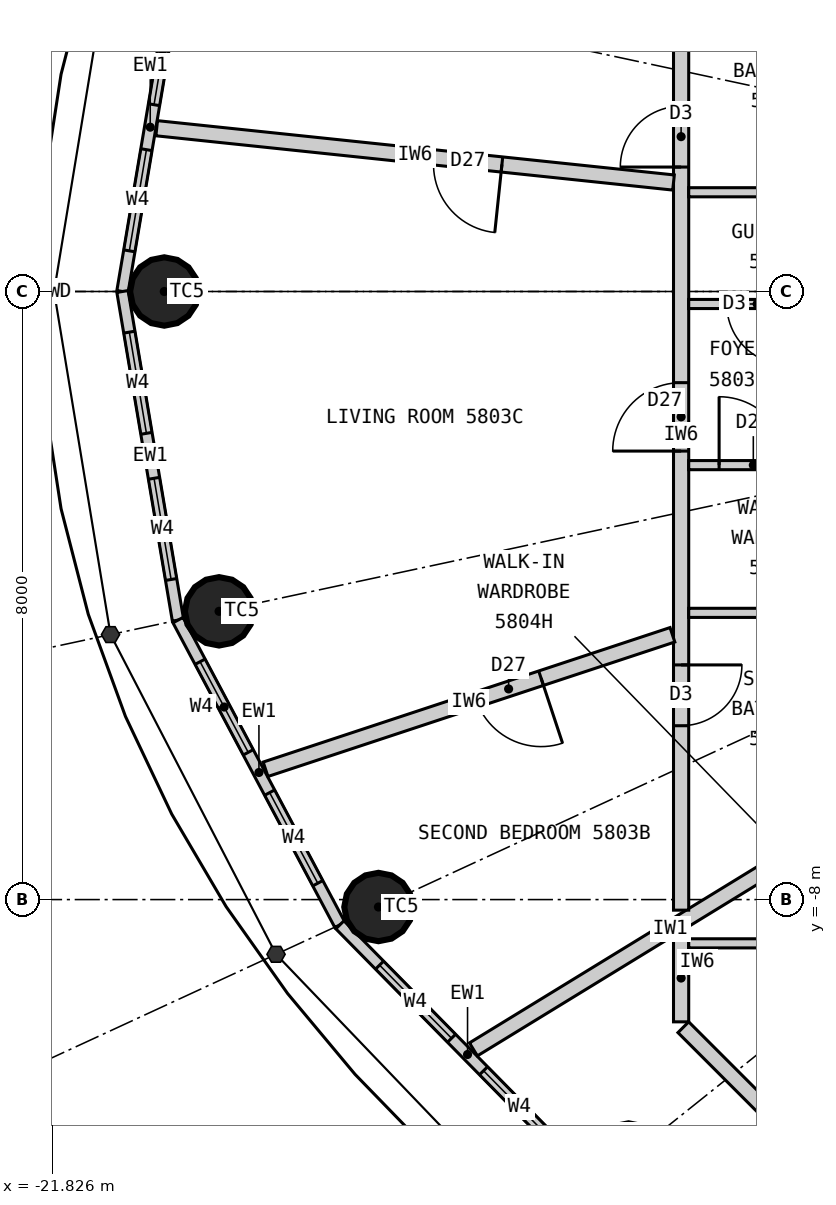
"""IFC4 building model, lengths in metres.
Left out: names, types, materials, properties, quantities, classifications, styles, units other than length and angle.
Written with IfcOpenShell. Run it as: python <this file> out.ifc"""

import sys

from ifc_helpers import new_model, si_unit, direction, frame, frame_2d, origin, origin_2d, place, context, subcontext, project, spatial, rectangle, circle, extrude, element, fill, save


model = new_model("IFC4")
c1 = context("Model", 3, precision=1e-05, world=origin(), true_north=direction((0.0, 1.0)))
c2 = subcontext(c1, "Body", "Model", "MODEL_VIEW")
j1 = project(units=[si_unit("LENGTHUNIT", "METRE"), si_unit("PLANEANGLEUNIT", "RADIAN")], contexts=[c1])
p1 = place(None, origin())
s1 = spatial("IfcSite", under=j1, at=p1, CompositionType="ELEMENT")
p2 = place(p1, origin())
s2 = spatial("IfcBuilding", under=s1, at=p2, CompositionType="ELEMENT")
p3 = place(p2, frame((0.0, 0.0, 216.0)))
s3 = spatial("IfcBuildingStorey", under=s2, at=p3, CompositionType="ELEMENT", Elevation=216.0)
for number, where, z_axis, x_axis in (
    (1, (-20.35, 0.0, 0.0), (0.0, 0.0, 1.0), (1.0, 0.0, 0.0)),
    (2, (-19.629, -4.208, 0.0), (0.0, 0.0, 1.0), (1.0, 0.0, 0.0)),
    (3, (-17.532, -8.098, 0.0), (0.0, 0.0, 1.0), (1.0, 0.0, 0.0)),
    (4, (-14.241, -11.393, 0.0), (0.0, 0.0, 1.0), (1.0, 0.0, 0.0)),
):
    element("IfcColumn", number, at=place(p3, frame(where, z_axis=z_axis, x_axis=x_axis)), inside=s3, PredefinedType="COLUMN", context=c2, shape_type="SweptSolid", body=[
        extrude(circle(Radius=0.45, at=origin_2d()), origin(), (0.0, 0.0, 1.0), 3.3),
    ])
p4 = place(p3, frame((-20.17, 4.323, 0.0), z_axis=(0.0, 0.0, 1.0), x_axis=(-0.166538513568, -0.986034950445, 0.0)))
e5 = element("IfcWall", 5, at=p4, inside=s3, PredefinedType="ELEMENTEDWALL", context=c2, shape_type="SweptSolid", body=[
    extrude(rectangle(XDim=4.385, YDim=0.15, at=frame_2d((2.192, 0.0))), origin(), (0.0, 0.0, 1.0), 3.12),
])
p5 = place(p4, frame((0.542, 0.0, 0.9)))
e6 = element("IfcOpeningElement", 6, at=p5, cuts=e5, PredefinedType="OPENING", context=c2, shape_type="SweptSolid", body=[
    extrude(rectangle(XDim=1.35, YDim=1.9, at=frame_2d((0.675, 0.95))), frame((0.0, 0.085, 0.0), z_axis=(0.0, -1.0, 0.0), x_axis=(1.0, 0.0, 0.0)), (0.0, 0.0, 1.0), 0.17),
])
p6 = place(p4, frame((2.492, 0.0, 0.9)))
e7 = element("IfcOpeningElement", 7, at=p6, cuts=e5, PredefinedType="OPENING", context=c2, shape_type="SweptSolid", body=[
    extrude(rectangle(XDim=1.35, YDim=1.9, at=frame_2d((0.675, 0.95))), frame((0.0, 0.085, 0.0), z_axis=(0.0, -1.0, 0.0), x_axis=(1.0, 0.0, 0.0)), (0.0, 0.0, 1.0), 0.17),
])
p7 = place(p3, frame((-20.9, 0.0, 0.0), z_axis=(0.0, 0.0, 1.0), x_axis=(0.166538513568, -0.986034950445, 0.0)))
e8 = element("IfcWall", 8, at=p7, inside=s3, PredefinedType="ELEMENTEDWALL", context=c2, shape_type="SweptSolid", body=[
    extrude(rectangle(XDim=4.385, YDim=0.15, at=frame_2d((2.192, 0.0))), origin(), (0.0, 0.0, 1.0), 3.12),
])
p8 = place(p7, frame((0.542, 0.0, 0.9)))
e9 = element("IfcOpeningElement", 9, at=p8, cuts=e8, PredefinedType="OPENING", context=c2, shape_type="SweptSolid", body=[
    extrude(rectangle(XDim=1.35, YDim=1.9, at=frame_2d((0.675, 0.95))), frame((0.0, 0.085, 0.0), z_axis=(0.0, -1.0, 0.0), x_axis=(1.0, 0.0, 0.0)), (0.0, 0.0, 1.0), 0.17),
])
p9 = place(p7, frame((2.492, 0.0, 0.9)))
e10 = element("IfcOpeningElement", 10, at=p9, cuts=e8, PredefinedType="OPENING", context=c2, shape_type="SweptSolid", body=[
    extrude(rectangle(XDim=1.35, YDim=1.9, at=frame_2d((0.675, 0.95))), frame((0.0, 0.085, 0.0), z_axis=(0.0, -1.0, 0.0), x_axis=(1.0, 0.0, 0.0)), (0.0, 0.0, 1.0), 0.17),
])
p10 = place(p3, frame((-20.17, -4.323, 0.0), z_axis=(0.0, 0.0, 1.0), x_axis=(0.469256152955, -0.883062094597, 0.0)))
e11 = element("IfcWall", 11, at=p10, inside=s3, PredefinedType="ELEMENTEDWALL", context=c2, shape_type="SweptSolid", body=[
    extrude(rectangle(XDim=4.539, YDim=0.15, at=frame_2d((2.27, 0.0))), origin(), (0.0, 0.0, 1.0), 3.12),
])
p11 = place(p10, frame((0.62, 0.0, 0.9)))
e12 = element("IfcOpeningElement", 12, at=p11, cuts=e11, PredefinedType="OPENING", context=c2, shape_type="SweptSolid", body=[
    extrude(rectangle(XDim=1.35, YDim=1.9, at=frame_2d((0.675, 0.95))), frame((0.0, 0.085, 0.0), z_axis=(0.0, -1.0, 0.0), x_axis=(1.0, 0.0, 0.0)), (0.0, 0.0, 1.0), 0.17),
])
p12 = place(p10, frame((2.57, 0.0, 0.9)))
e13 = element("IfcOpeningElement", 13, at=p12, cuts=e11, PredefinedType="OPENING", context=c2, shape_type="SweptSolid", body=[
    extrude(rectangle(XDim=1.35, YDim=1.9, at=frame_2d((0.675, 0.95))), frame((0.0, 0.085, 0.0), z_axis=(0.0, -1.0, 0.0), x_axis=(1.0, 0.0, 0.0)), (0.0, 0.0, 1.0), 0.17),
])
p13 = place(p3, frame((-18.04, -8.332, 0.0), z_axis=(0.0, 0.0, 1.0), x_axis=(0.701527379618, -0.712642501993, 0.0)))
e14 = element("IfcWall", 14, at=p13, inside=s3, PredefinedType="ELEMENTEDWALL", context=c2, shape_type="SweptSolid", body=[
    extrude(rectangle(XDim=4.788, YDim=0.15, at=frame_2d((2.394, 0.0))), origin(), (0.0, 0.0, 1.0), 3.12),
])
p14 = place(p13, frame((0.744, 0.0, 0.9)))
e15 = element("IfcOpeningElement", 15, at=p14, cuts=e14, PredefinedType="OPENING", context=c2, shape_type="SweptSolid", body=[
    extrude(rectangle(XDim=1.35, YDim=1.9, at=frame_2d((0.675, 0.95))), frame((0.0, 0.085, 0.0), z_axis=(0.0, -1.0, 0.0), x_axis=(1.0, 0.0, 0.0)), (0.0, 0.0, 1.0), 0.17),
])
p15 = place(p13, frame((2.694, 0.0, 0.9)))
e16 = element("IfcOpeningElement", 16, at=p15, cuts=e14, PredefinedType="OPENING", context=c2, shape_type="SweptSolid", body=[
    extrude(rectangle(XDim=1.35, YDim=1.9, at=frame_2d((0.675, 0.95))), frame((0.0, 0.085, 0.0), z_axis=(0.0, -1.0, 0.0), x_axis=(1.0, 0.0, 0.0)), (0.0, 0.0, 1.0), 0.17),
])
p16 = place(p3, frame((-11.1, -6.797, 0.0), z_axis=(0.0, 0.0, 1.0), x_axis=(-0.852799818179, -0.522237943963, 0.0)))
e17 = element("IfcWall", 17, at=p16, inside=s3, PredefinedType="PARTITIONING", context=c2, shape_type="SweptSolid", body=[
    extrude(rectangle(XDim=6.077, YDim=0.2, at=frame_2d((3.039, 0.0))), origin(), (0.0, 0.0, 1.0), 3.12),
])
p17 = place(p3, frame((-13.55, 4.357, 0.0), z_axis=(0.0, 0.0, 1.0), x_axis=(0.0, -1.0, 0.0)))
e18 = element("IfcWall", 18, at=p17, inside=s3, PredefinedType="PARTITIONING", context=c2, shape_type="SweptSolid", body=[
    extrude(rectangle(XDim=12.496, YDim=0.2, at=frame_2d((6.248, 0.0))), origin(), (0.0, 0.0, 1.0), 3.12),
])
p18 = place(p17, frame((1.92, 0.0, 0.0)))
e19 = element("IfcOpeningElement", 19, at=p18, cuts=e18, PredefinedType="OPENING", context=c2, shape_type="SweptSolid", body=[
    extrude(rectangle(XDim=0.8, YDim=2.1, at=frame_2d((0.4, 1.05))), frame((0.0, 0.11, 0.0), z_axis=(0.0, -1.0, 0.0), x_axis=(1.0, 0.0, 0.0)), (0.0, 0.0, 1.0), 0.22),
])
p19 = place(p17, frame((9.27, 0.0, 0.0)))
e20 = element("IfcOpeningElement", 20, at=p19, cuts=e18, PredefinedType="OPENING", context=c2, shape_type="SweptSolid", body=[
    extrude(rectangle(XDim=0.8, YDim=2.1, at=frame_2d((0.4, 1.05))), frame((0.0, 0.11, 0.0), z_axis=(0.0, -1.0, 0.0), x_axis=(1.0, 0.0, 0.0)), (0.0, 0.0, 1.0), 0.22),
])
p20 = place(p17, frame((5.557, 0.0, 0.0)))
e21 = element("IfcOpeningElement", 21, at=p20, cuts=e18, PredefinedType="OPENING", context=c2, shape_type="SweptSolid", body=[
    extrude(rectangle(XDim=0.9, YDim=2.1, at=frame_2d((0.45, 1.05))), frame((0.0, 0.11, 0.0), z_axis=(0.0, -1.0, 0.0), x_axis=(1.0, 0.0, 0.0)), (0.0, 0.0, 1.0), 0.22),
])
p21 = place(p3, frame((-13.65, 1.434, 0.0), z_axis=(0.0, 0.0, 1.0), x_axis=(-0.994526954268, 0.10448031984, 0.0)))
e22 = element("IfcWall", 22, at=p21, inside=s3, PredefinedType="PARTITIONING", context=c2, shape_type="SweptSolid", body=[
    extrude(rectangle(XDim=6.837, YDim=0.2, at=frame_2d((3.418, 0.0))), origin(), (0.0, 0.0, 1.0), 2.47),
])
p22 = place(p21, frame((2.27, 0.0, 0.0)))
e23 = element("IfcOpeningElement", 23, at=p22, cuts=e22, PredefinedType="OPENING", context=c2, shape_type="SweptSolid", body=[
    extrude(rectangle(XDim=0.9, YDim=2.1, at=frame_2d((0.45, 1.05))), frame((0.0, 0.11, 0.0), z_axis=(0.0, -1.0, 0.0), x_axis=(1.0, 0.0, 0.0)), (0.0, 0.0, 1.0), 0.22),
])
p23 = place(p3, frame((-13.664, -4.516, 0.0), z_axis=(0.0, 0.0, 1.0), x_axis=(-0.949481375941, -0.313823384632, 0.0)))
e24 = element("IfcWall", 24, at=p23, inside=s3, PredefinedType="PARTITIONING", context=c2, shape_type="SweptSolid", body=[
    extrude(rectangle(XDim=5.638, YDim=0.2, at=frame_2d((2.819, 0.0))), origin(), (0.0, 0.0, 1.0), 3.12),
])
p24 = place(p23, frame((1.82, 0.0, 0.0)))
e25 = element("IfcOpeningElement", 25, at=p24, cuts=e24, PredefinedType="OPENING", context=c2, shape_type="SweptSolid", body=[
    extrude(rectangle(XDim=0.9, YDim=2.1, at=frame_2d((0.45, 1.05))), frame((0.0, 0.11, 0.0), z_axis=(0.0, -1.0, 0.0), x_axis=(1.0, 0.0, 0.0)), (0.0, 0.0, 1.0), 0.22),
])
p25 = place(p3, frame((-11.1, 1.306, 0.0), z_axis=(0.0, 0.0, 1.0), x_axis=(-1.0, 0.0, 0.0)))
e26 = element("IfcWall", 26, at=p25, inside=s3, PredefinedType="PARTITIONING", context=c2, shape_type="SweptSolid", body=[
    extrude(rectangle(XDim=2.35, YDim=0.12, at=frame_2d((1.175, 0.0))), origin(), (0.0, 0.0, 1.0), 3.12),
])
p26 = place(p3, frame((-11.1, -0.164, 0.0), z_axis=(0.0, 0.0, 1.0), x_axis=(-1.0, 0.0, 0.0)))
e27 = element("IfcWall", 27, at=p26, inside=s3, PredefinedType="PARTITIONING", context=c2, shape_type="SweptSolid", body=[
    extrude(rectangle(XDim=2.35, YDim=0.12, at=frame_2d((1.175, 0.0))), origin(), (0.0, 0.0, 1.0), 3.12),
])
p27 = place(p26, frame((1.05, 0.0, 0.0)))
e28 = element("IfcOpeningElement", 28, at=p27, cuts=e27, PredefinedType="OPENING", context=c2, shape_type="SweptSolid", body=[
    extrude(rectangle(XDim=0.8, YDim=2.1, at=frame_2d((0.4, 1.05))), frame((0.0, 0.07, 0.0), z_axis=(0.0, -1.0, 0.0), x_axis=(1.0, 0.0, 0.0)), (0.0, 0.0, 1.0), 0.14),
])
p28 = place(p3, frame((-11.1, -2.284, 0.0), z_axis=(0.0, 0.0, 1.0), x_axis=(-1.0, 0.0, 0.0)))
e29 = element("IfcWall", 29, at=p28, inside=s3, PredefinedType="PARTITIONING", context=c2, shape_type="SweptSolid", body=[
    extrude(rectangle(XDim=2.35, YDim=0.12, at=frame_2d((1.175, 0.0))), origin(), (0.0, 0.0, 1.0), 3.12),
])
p29 = place(p28, frame((1.05, 0.0, 0.0)))
e30 = element("IfcOpeningElement", 30, at=p29, cuts=e29, PredefinedType="OPENING", context=c2, shape_type="SweptSolid", body=[
    extrude(rectangle(XDim=0.9, YDim=2.1, at=frame_2d((0.45, 1.05))), frame((0.0, 0.07, 0.0), z_axis=(0.0, -1.0, 0.0), x_axis=(1.0, 0.0, 0.0)), (0.0, 0.0, 1.0), 0.14),
])
p30 = place(p3, frame((-11.1, -4.228, 0.0), z_axis=(0.0, 0.0, 1.0), x_axis=(-1.0, 0.0, 0.0)))
e31 = element("IfcWall", 31, at=p30, inside=s3, PredefinedType="PARTITIONING", context=c2, shape_type="SweptSolid", body=[
    extrude(rectangle(XDim=2.35, YDim=0.12, at=frame_2d((1.175, 0.0))), origin(), (0.0, 0.0, 1.0), 3.12),
])
p31 = place(p3, frame((-13.55, -8.456, 0.0), z_axis=(0.0, 0.0, 1.0), x_axis=(0.0, -1.0, 0.0)))
e32 = element("IfcWall", 32, at=p31, inside=s3, PredefinedType="PARTITIONING", context=c2, shape_type="SweptSolid", body=[
    extrude(rectangle(XDim=1.153, YDim=0.2, at=frame_2d((0.576, 0.0))), origin(), (0.0, 0.0, 1.0), 3.12),
])
p32 = place(p3, frame((-13.521, -9.679, 0.0), z_axis=(0.0, 0.0, 1.0), x_axis=(0.707106781187, -0.707106781187, 0.0)))
e33 = element("IfcWall", 33, at=p32, inside=s3, PredefinedType="PARTITIONING", context=c2, shape_type="SweptSolid", body=[
    extrude(rectangle(XDim=4.019, YDim=0.2, at=frame_2d((2.009, 0.0))), origin(), (0.0, 0.0, 1.0), 3.12),
])
p33 = place(p32, frame((1.57, 0.0, 0.0)))
e34 = element("IfcOpeningElement", 34, at=p33, cuts=e33, PredefinedType="OPENING", context=c2, shape_type="SweptSolid", body=[
    extrude(rectangle(XDim=0.9, YDim=2.1, at=frame_2d((0.45, 1.05))), frame((0.0, 0.11, 0.0), z_axis=(0.0, -1.0, 0.0), x_axis=(1.0, 0.0, 0.0)), (0.0, 0.0, 1.0), 0.22),
])
p34 = place(p3, frame((-11.1, -8.576, 0.0), z_axis=(0.0, 0.0, 1.0), x_axis=(-1.0, 0.0, 0.0)))
e35 = element("IfcWall", 35, at=p34, inside=s3, PredefinedType="PARTITIONING", context=c2, shape_type="SweptSolid", body=[
    extrude(rectangle(XDim=2.35, YDim=0.12, at=frame_2d((1.175, 0.0))), origin(), (0.0, 0.0, 1.0), 3.12),
])
p35 = place(p34, frame((0.22, 0.0, 0.0)))
e36 = element("IfcOpeningElement", 36, at=p35, cuts=e35, PredefinedType="OPENING", context=c2, shape_type="SweptSolid", body=[
    extrude(rectangle(XDim=0.9, YDim=2.1, at=frame_2d((0.45, 1.05))), frame((0.0, 0.07, 0.0), z_axis=(0.0, -1.0, 0.0), x_axis=(1.0, 0.0, 0.0)), (0.0, 0.0, 1.0), 0.14),
])
p36 = place(p5, origin())
e37 = element("IfcWindow", 37, at=p36, inside=s3, PartitioningType="SINGLE_PANEL", PredefinedType="WINDOW", context=c2, shape_type="SweptSolid", body=[
    extrude(rectangle(XDim=1.35, YDim=1.9, at=frame_2d((0.675, 0.95))), frame((0.0, 0.03, 0.0), z_axis=(0.0, -1.0, 0.0), x_axis=(1.0, 0.0, 0.0)), (0.0, 0.0, 1.0), 0.06),
])
fill(e6, e37)
p37 = place(p6, origin())
e38 = element("IfcWindow", 38, at=p37, inside=s3, PartitioningType="SINGLE_PANEL", PredefinedType="WINDOW", context=c2, shape_type="SweptSolid", body=[
    extrude(rectangle(XDim=1.35, YDim=1.9, at=frame_2d((0.675, 0.95))), frame((0.0, 0.03, 0.0), z_axis=(0.0, -1.0, 0.0), x_axis=(1.0, 0.0, 0.0)), (0.0, 0.0, 1.0), 0.06),
])
fill(e7, e38)
p38 = place(p8, origin())
e39 = element("IfcWindow", 39, at=p38, inside=s3, PartitioningType="SINGLE_PANEL", PredefinedType="WINDOW", context=c2, shape_type="SweptSolid", body=[
    extrude(rectangle(XDim=1.35, YDim=1.9, at=frame_2d((0.675, 0.95))), frame((0.0, 0.03, 0.0), z_axis=(0.0, -1.0, 0.0), x_axis=(1.0, 0.0, 0.0)), (0.0, 0.0, 1.0), 0.06),
])
fill(e9, e39)
p39 = place(p9, origin())
e40 = element("IfcWindow", 40, at=p39, inside=s3, PartitioningType="SINGLE_PANEL", PredefinedType="WINDOW", context=c2, shape_type="SweptSolid", body=[
    extrude(rectangle(XDim=1.35, YDim=1.9, at=frame_2d((0.675, 0.95))), frame((0.0, 0.03, 0.0), z_axis=(0.0, -1.0, 0.0), x_axis=(1.0, 0.0, 0.0)), (0.0, 0.0, 1.0), 0.06),
])
fill(e10, e40)
p40 = place(p11, origin())
e41 = element("IfcWindow", 41, at=p40, inside=s3, PartitioningType="SINGLE_PANEL", PredefinedType="WINDOW", context=c2, shape_type="SweptSolid", body=[
    extrude(rectangle(XDim=1.35, YDim=1.9, at=frame_2d((0.675, 0.95))), frame((0.0, 0.03, 0.0), z_axis=(0.0, -1.0, 0.0), x_axis=(1.0, 0.0, 0.0)), (0.0, 0.0, 1.0), 0.06),
])
fill(e12, e41)
p41 = place(p12, origin())
e42 = element("IfcWindow", 42, at=p41, inside=s3, PartitioningType="SINGLE_PANEL", PredefinedType="WINDOW", context=c2, shape_type="SweptSolid", body=[
    extrude(rectangle(XDim=1.35, YDim=1.9, at=frame_2d((0.675, 0.95))), frame((0.0, 0.03, 0.0), z_axis=(0.0, -1.0, 0.0), x_axis=(1.0, 0.0, 0.0)), (0.0, 0.0, 1.0), 0.06),
])
fill(e13, e42)
p42 = place(p14, origin())
e43 = element("IfcWindow", 43, at=p42, inside=s3, PartitioningType="SINGLE_PANEL", PredefinedType="WINDOW", context=c2, shape_type="SweptSolid", body=[
    extrude(rectangle(XDim=1.35, YDim=1.9, at=frame_2d((0.675, 0.95))), frame((0.0, 0.03, 0.0), z_axis=(0.0, -1.0, 0.0), x_axis=(1.0, 0.0, 0.0)), (0.0, 0.0, 1.0), 0.06),
])
fill(e15, e43)
p43 = place(p15, origin())
e44 = element("IfcWindow", 44, at=p43, inside=s3, PartitioningType="SINGLE_PANEL", PredefinedType="WINDOW", context=c2, shape_type="SweptSolid", body=[
    extrude(rectangle(XDim=1.35, YDim=1.9, at=frame_2d((0.675, 0.95))), frame((0.0, 0.03, 0.0), z_axis=(0.0, -1.0, 0.0), x_axis=(1.0, 0.0, 0.0)), (0.0, 0.0, 1.0), 0.06),
])
fill(e16, e44)
p44 = place(p18, origin())
e45 = element("IfcDoor", 45, at=p44, inside=s3, OperationType="SINGLE_SWING_RIGHT", PredefinedType="DOOR", context=c2, shape_type="SweptSolid", body=[
    extrude(rectangle(XDim=0.8, YDim=2.1, at=frame_2d((0.4, 1.05))), frame((0.0, 0.025, 0.0), z_axis=(0.0, -1.0, 0.0), x_axis=(1.0, 0.0, 0.0)), (0.0, 0.0, 1.0), 0.05),
])
fill(e19, e45)
p45 = place(p27, origin())
e46 = element("IfcDoor", 46, at=p45, inside=s3, OperationType="SINGLE_SWING_LEFT", PredefinedType="DOOR", context=c2, shape_type="SweptSolid", body=[
    extrude(rectangle(XDim=0.8, YDim=2.1, at=frame_2d((0.4, 1.05))), frame((0.0, 0.025, 0.0), z_axis=(0.0, -1.0, 0.0), x_axis=(1.0, 0.0, 0.0)), (0.0, 0.0, 1.0), 0.05),
])
fill(e28, e46)
p46 = place(p29, origin())
e47 = element("IfcDoor", 47, at=p46, inside=s3, OperationType="SINGLE_SWING_RIGHT", PredefinedType="DOOR", context=c2, shape_type="SweptSolid", body=[
    extrude(rectangle(XDim=0.9, YDim=2.1, at=frame_2d((0.45, 1.05))), frame((0.0, 0.025, 0.0), z_axis=(0.0, -1.0, 0.0), x_axis=(1.0, 0.0, 0.0)), (0.0, 0.0, 1.0), 0.05),
])
fill(e30, e47)
p47 = place(p19, origin())
e48 = element("IfcDoor", 48, at=p47, inside=s3, OperationType="SINGLE_SWING_LEFT", PredefinedType="DOOR", context=c2, shape_type="SweptSolid", body=[
    extrude(rectangle(XDim=0.8, YDim=2.1, at=frame_2d((0.4, 1.05))), frame((0.0, 0.025, 0.0), z_axis=(0.0, -1.0, 0.0), x_axis=(1.0, 0.0, 0.0)), (0.0, 0.0, 1.0), 0.05),
])
fill(e20, e48)
p48 = place(p20, origin())
e49 = element("IfcDoor", 49, at=p48, inside=s3, OperationType="SINGLE_SWING_RIGHT", PredefinedType="DOOR", context=c2, shape_type="SweptSolid", body=[
    extrude(rectangle(XDim=0.9, YDim=2.1, at=frame_2d((0.45, 1.05))), frame((0.0, 0.025, 0.0), z_axis=(0.0, -1.0, 0.0), x_axis=(1.0, 0.0, 0.0)), (0.0, 0.0, 1.0), 0.05),
])
fill(e21, e49)
p49 = place(p22, origin())
e50 = element("IfcDoor", 50, at=p49, inside=s3, OperationType="SINGLE_SWING_LEFT", PredefinedType="DOOR", context=c2, shape_type="SweptSolid", body=[
    extrude(rectangle(XDim=0.9, YDim=2.1, at=frame_2d((0.45, 1.05))), frame((0.0, 0.025, 0.0), z_axis=(0.0, -1.0, 0.0), x_axis=(1.0, 0.0, 0.0)), (0.0, 0.0, 1.0), 0.05),
])
fill(e23, e50)
p50 = place(p24, origin())
e51 = element("IfcDoor", 51, at=p50, inside=s3, OperationType="SINGLE_SWING_LEFT", PredefinedType="DOOR", context=c2, shape_type="SweptSolid", body=[
    extrude(rectangle(XDim=0.9, YDim=2.1, at=frame_2d((0.45, 1.05))), frame((0.0, 0.025, 0.0), z_axis=(0.0, -1.0, 0.0), x_axis=(1.0, 0.0, 0.0)), (0.0, 0.0, 1.0), 0.05),
])
fill(e25, e51)
save(model, sys.argv[1])
